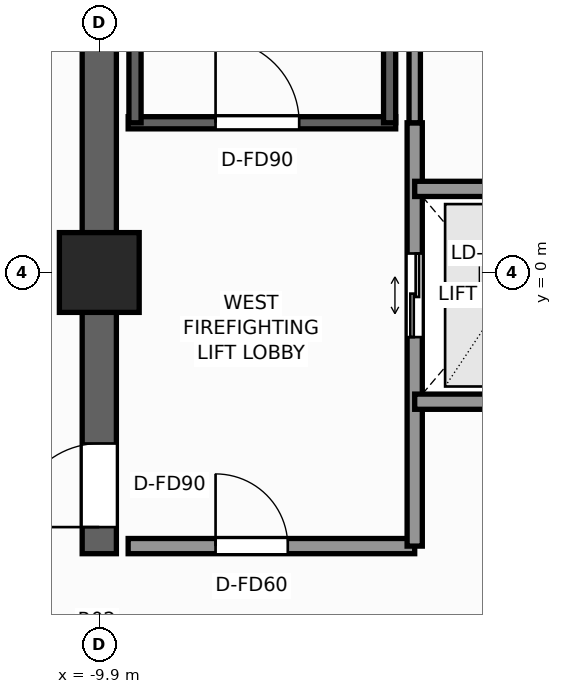
"""IFC4 building model, lengths in metres.
Left out: names, types, materials, properties, quantities, classifications, styles, units other than length and angle.
Written with IfcOpenShell. Run it as: python <this file> out.ifc"""

import sys

from ifc_helpers import new_model, si_unit, direction, frame, frame_2d, origin, origin_2d, place, context, subcontext, project, spatial, rectangle, extrude, element, fill, save


model = new_model("IFC4")
c1 = context("Model", 3, precision=1e-05, world=origin(), true_north=direction((0.0, 1.0)))
c2 = subcontext(c1, "Body", "Model", "MODEL_VIEW")
j1 = project(units=[si_unit("LENGTHUNIT", "METRE"), si_unit("PLANEANGLEUNIT", "RADIAN")], contexts=[c1])
p1 = place(None, origin())
s1 = spatial("IfcSite", under=j1, at=p1, CompositionType="ELEMENT")
p2 = place(p1, origin())
s2 = spatial("IfcBuilding", under=s1, at=p2, CompositionType="ELEMENT")
p3 = place(p2, frame((0.0, 0.0, 222.9)))
s3 = spatial("IfcBuildingStorey", under=s2, at=p3, CompositionType="ELEMENT", Elevation=222.9)
p4 = place(p3, frame((-9.9, -3.7, 0.0), z_axis=(0.0, 0.0, 1.0), x_axis=(0.0, 1.0, 0.0)))
e1 = element("IfcWall", 1, at=p4, inside=s3, PredefinedType="SHEAR", context=c2, shape_type="SweptSolid", body=[
    extrude(rectangle(XDim=13.375, YDim=0.45, at=frame_2d((6.688, 0.0))), origin(), (0.0, 0.0, 1.0), 3.3),
])
p5 = place(p4, frame((0.35, 0.0, 0.0)))
e2 = element("IfcOpeningElement", 2, at=p5, cuts=e1, PredefinedType="OPENING", context=c2, shape_type="SweptSolid", body=[
    extrude(rectangle(XDim=1.1, YDim=2.2, at=frame_2d((0.55, 1.1))), frame((0.0, 0.235, 0.0), z_axis=(0.0, -1.0, 0.0), x_axis=(1.0, 0.0, 0.0)), (0.0, 0.0, 1.0), 0.47),
])
p6 = place(p3, frame((-9.9, 0.0, 0.0), z_axis=(0.0, 0.0, 1.0), x_axis=(1.0, 0.0, 0.0)))
e3 = element("IfcColumn", 3, at=p6, inside=s3, PredefinedType="COLUMN", context=c2, shape_type="SweptSolid", body=[
    extrude(rectangle(XDim=1.05, YDim=1.05, at=origin_2d()), origin(), (0.0, 0.0, 1.0), 3.3),
])
p7 = place(p3, frame((-9.52, 1.97, 0.0), z_axis=(0.0, 0.0, 1.0), x_axis=(1.0, 0.0, 0.0)))
e4 = element("IfcWall", 4, at=p7, inside=s3, PredefinedType="SHEAR", context=c2, shape_type="SweptSolid", body=[
    extrude(rectangle(XDim=3.52, YDim=0.16, at=frame_2d((1.76, 0.0))), origin(), (0.0, 0.0, 1.0), 3.3),
])
p8 = place(p7, frame((1.15, 0.0, 0.0)))
e5 = element("IfcOpeningElement", 5, at=p8, cuts=e4, PredefinedType="OPENING", context=c2, shape_type="SweptSolid", body=[
    extrude(rectangle(XDim=1.1, YDim=2.2, at=frame_2d((0.55, 1.1))), frame((0.0, 0.09, 0.0), z_axis=(0.0, -1.0, 0.0), x_axis=(1.0, 0.0, 0.0)), (0.0, 0.0, 1.0), 0.18),
])
for number, where, z_axis, x_axis in (
    (6, (-9.43, 1.97, 0.0), (0.0, 0.0, 1.0), (0.0, 1.0, 0.0)),
    (7, (-6.08, 1.97, 0.0), (0.0, 0.0, 1.0), (0.0, 1.0, 0.0)),
):
    element("IfcWall", number, at=place(p3, frame(where, z_axis=z_axis, x_axis=x_axis)), inside=s3, PredefinedType="SHEAR", context=c2, shape_type="SweptSolid", body=[
        extrude(rectangle(XDim=7.56, YDim=0.16, at=frame_2d((3.78, 0.0))), origin(), (0.0, 0.0, 1.0), 3.3),
    ])
p9 = place(p3, frame((-9.52, -3.6, 0.0), z_axis=(0.0, 0.0, 1.0), x_axis=(1.0, 0.0, 0.0)))
e8 = element("IfcWall", 8, at=p9, inside=s3, PredefinedType="SOLIDWALL", context=c2, shape_type="SweptSolid", body=[
    extrude(rectangle(XDim=3.77, YDim=0.2, at=frame_2d((1.885, 0.0))), origin(), (0.0, 0.0, 1.0), 3.08),
])
p10 = place(p9, frame((1.15, 0.0, 0.0)))
e9 = element("IfcOpeningElement", 9, at=p10, cuts=e8, PredefinedType="OPENING", context=c2, shape_type="SweptSolid", body=[
    extrude(rectangle(XDim=0.95, YDim=2.06, at=frame_2d((0.475, 1.03))), frame((0.0, 0.11, 0.0), z_axis=(0.0, -1.0, 0.0), x_axis=(1.0, 0.0, 0.0)), (0.0, 0.0, 1.0), 0.22),
])
p11 = place(p3, frame((-5.75, -3.6, 0.0), z_axis=(0.0, 0.0, 1.0), x_axis=(0.0, 1.0, 0.0)))
e10 = element("IfcWall", 10, at=p11, inside=s3, PredefinedType="SOLIDWALL", context=c2, shape_type="SweptSolid", body=[
    extrude(rectangle(XDim=5.57, YDim=0.2, at=frame_2d((2.785, 0.0))), origin(), (0.0, 0.0, 1.0), 3.08),
])
p12 = place(p11, frame((2.75, 0.0, 0.0)))
e11 = element("IfcOpeningElement", 11, at=p12, cuts=e10, PredefinedType="OPENING", context=c2, shape_type="SweptSolid", body=[
    extrude(rectangle(XDim=1.1, YDim=2.2, at=frame_2d((0.55, 1.1))), frame((0.0, 0.11, 0.0), z_axis=(0.0, -1.0, 0.0), x_axis=(1.0, 0.0, 0.0)), (0.0, 0.0, 1.0), 0.22),
])
for number, where, z_axis, x_axis in (
    (12, (-5.75, -1.7, 0.0), (0.0, 0.0, 1.0), (1.0, 0.0, 0.0)),
    (13, (-5.75, 1.1, 0.0), (0.0, 0.0, 1.0), (1.0, 0.0, 0.0)),
):
    element("IfcWall", number, at=place(p3, frame(where, z_axis=z_axis, x_axis=x_axis)), inside=s3, PredefinedType="SOLIDWALL", context=c2, shape_type="SweptSolid", body=[
        extrude(rectangle(XDim=2.4, YDim=0.2, at=frame_2d((1.2, 0.0))), origin(), (0.0, 0.0, 1.0), 3.08),
    ])
p13 = place(p3, frame((-5.75, 1.97, 0.0), z_axis=(0.0, 0.0, 1.0), x_axis=(0.0, 1.0, 0.0)))
e14 = element("IfcWall", 14, at=p13, inside=s3, PredefinedType="PARTITIONING", context=c2, shape_type="SweptSolid", body=[
    extrude(rectangle(XDim=2.33, YDim=0.15, at=frame_2d((1.165, 0.0))), origin(), (0.0, 0.0, 1.0), 3.08),
])
p14 = place(p8, origin())
e15 = element("IfcDoor", 15, at=p14, inside=s3, OperationType="SINGLE_SWING_LEFT", PredefinedType="DOOR", context=c2, shape_type="SweptSolid", body=[
    extrude(rectangle(XDim=1.1, YDim=2.2, at=frame_2d((0.55, 1.1))), frame((0.0, 0.025, 0.0), z_axis=(0.0, -1.0, 0.0), x_axis=(1.0, 0.0, 0.0)), (0.0, 0.0, 1.0), 0.05),
])
fill(e5, e15)
p15 = place(p5, origin())
e16 = element("IfcDoor", 16, at=p15, inside=s3, OperationType="SINGLE_SWING_LEFT", PredefinedType="DOOR", context=c2, shape_type="SweptSolid", body=[
    extrude(rectangle(XDim=1.1, YDim=2.2, at=frame_2d((0.55, 1.1))), frame((0.0, 0.025, 0.0), z_axis=(0.0, -1.0, 0.0), x_axis=(1.0, 0.0, 0.0)), (0.0, 0.0, 1.0), 0.05),
])
fill(e2, e16)
p16 = place(p12, origin())
e17 = element("IfcDoor", 17, at=p16, inside=s3, OperationType="DOUBLE_DOOR_SLIDING", PredefinedType="DOOR", context=c2, shape_type="SweptSolid", body=[
    extrude(rectangle(XDim=1.1, YDim=2.2, at=frame_2d((0.55, 1.1))), frame((0.0, 0.025, 0.0), z_axis=(0.0, -1.0, 0.0), x_axis=(1.0, 0.0, 0.0)), (0.0, 0.0, 1.0), 0.05),
])
fill(e11, e17)
p17 = place(p10, origin())
e18 = element("IfcDoor", 18, at=p17, inside=s3, OperationType="SINGLE_SWING_LEFT", PredefinedType="DOOR", context=c2, shape_type="SweptSolid", body=[
    extrude(rectangle(XDim=0.95, YDim=2.06, at=frame_2d((0.475, 1.03))), frame((0.0, 0.025, 0.0), z_axis=(0.0, -1.0, 0.0), x_axis=(1.0, 0.0, 0.0)), (0.0, 0.0, 1.0), 0.05),
])
fill(e9, e18)
save(model, sys.argv[1])
